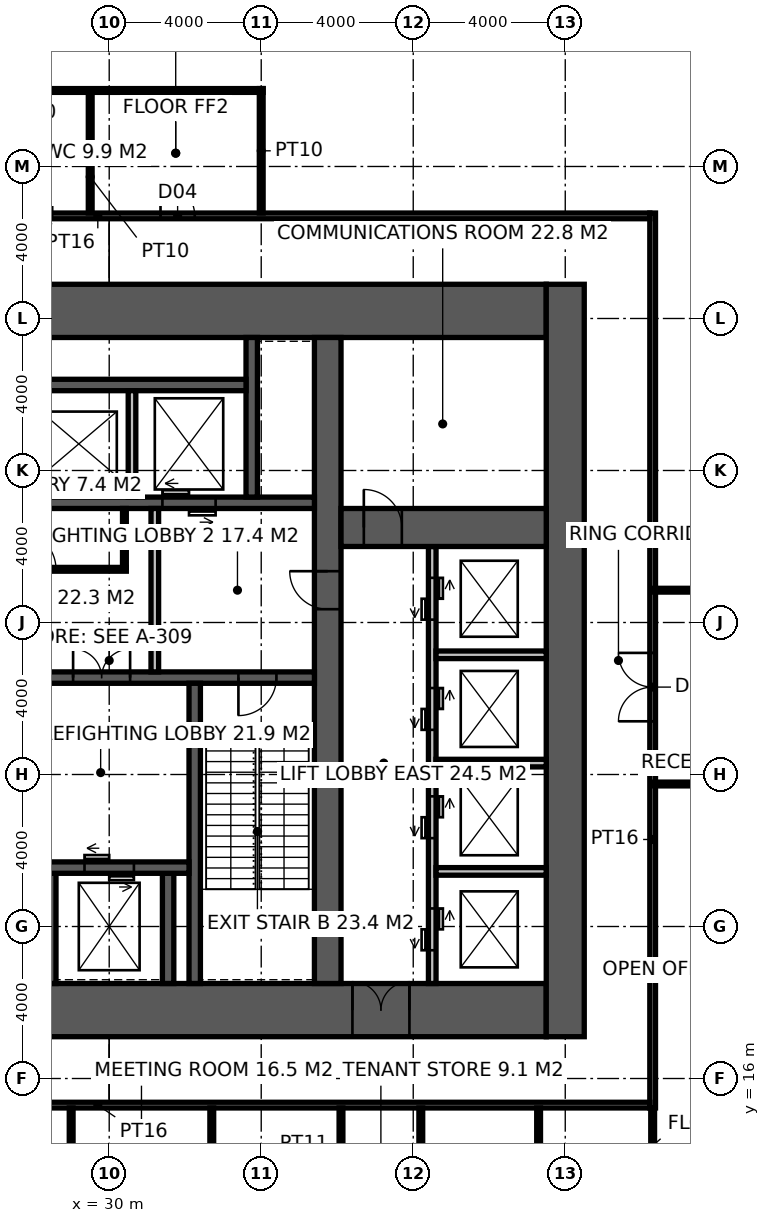
"""IFC4 building model, lengths in metres.
Left out: names, types, materials, properties, quantities, classifications, styles, units other than length and angle.
Written with IfcOpenShell. Run it as: python <this file> out.ifc"""

import sys

from ifc_helpers import new_model, si_unit, direction, frame, frame_2d, origin, place, context, subcontext, project, spatial, rectangle, extrude, element, fill, save


model = new_model("IFC4")
c1 = context("Model", 3, precision=1e-05, world=origin(), true_north=direction((0.0, 1.0)))
c2 = subcontext(c1, "Body", "Model", "MODEL_VIEW")
j1 = project(units=[si_unit("LENGTHUNIT", "METRE"), si_unit("PLANEANGLEUNIT", "RADIAN")], contexts=[c1])
p1 = place(None, origin())
s1 = spatial("IfcSite", under=j1, at=p1, CompositionType="ELEMENT")
p2 = place(p1, origin())
s2 = spatial("IfcBuilding", under=s1, at=p2, CompositionType="ELEMENT")
p3 = place(p2, frame((0.0, 0.0, 6.0)))
s3 = spatial("IfcBuildingStorey", under=s2, at=p3, CompositionType="ELEMENT", Elevation=6.0)
p4 = place(p3, frame((18.5, 17.8, -0.15), z_axis=(0.0, 0.0, 1.0), x_axis=(1.0, 0.0, 0.0)))
e1 = element("IfcWall", 1, at=p4, inside=s3, PredefinedType="SHEAR", context=c2, shape_type="SweptSolid", body=[
    extrude(rectangle(XDim=23.0, YDim=1.4, at=frame_2d((11.5, 0.0))), origin(), (0.0, 0.0, 1.0), 5.0),
])
p5 = place(p4, frame((3.45, 0.0, 0.15)))
e2 = element("IfcOpeningElement", 2, at=p5, cuts=e1, PredefinedType="OPENING", context=c2, shape_type="SweptSolid", body=[
    extrude(rectangle(XDim=1.5, YDim=2.4, at=frame_2d((0.75, 1.2))), frame((0.0, 0.71, 0.0), z_axis=(0.0, -1.0, 0.0), x_axis=(1.0, 0.0, 0.0)), (0.0, 0.0, 1.0), 1.42),
])
p6 = place(p4, frame((17.9, 0.0, 0.15)))
e3 = element("IfcOpeningElement", 3, at=p6, cuts=e1, PredefinedType="OPENING", context=c2, shape_type="SweptSolid", body=[
    extrude(rectangle(XDim=1.5, YDim=2.4, at=frame_2d((0.75, 1.2))), frame((0.0, 0.71, 0.0), z_axis=(0.0, -1.0, 0.0), x_axis=(1.0, 0.0, 0.0)), (0.0, 0.0, 1.0), 1.42),
])
p7 = place(p4, frame((0.9, 0.0, 0.15)))
e4 = element("IfcOpeningElement", 4, at=p7, cuts=e1, PredefinedType="OPENING", context=c2, shape_type="SweptSolid", body=[
    extrude(rectangle(XDim=1.0, YDim=2.2, at=frame_2d((0.5, 1.1))), frame((0.0, 0.71, 0.0), z_axis=(0.0, -1.0, 0.0), x_axis=(1.0, 0.0, 0.0)), (0.0, 0.0, 1.0), 1.42),
])
p8 = place(p3, frame((18.5, 36.2, -0.15), z_axis=(0.0, 0.0, 1.0), x_axis=(1.0, 0.0, 0.0)))
e5 = element("IfcWall", 5, at=p8, inside=s3, PredefinedType="SHEAR", context=c2, shape_type="SweptSolid", body=[
    extrude(rectangle(XDim=23.0, YDim=1.4, at=frame_2d((11.5, 0.0))), origin(), (0.0, 0.0, 1.0), 5.0),
])
p9 = place(p3, frame((42.0, 17.1, -0.15), z_axis=(0.0, 0.0, 1.0), x_axis=(0.0, 1.0, 0.0)))
e6 = element("IfcWall", 6, at=p9, inside=s3, PredefinedType="SHEAR", context=c2, shape_type="SweptSolid", body=[
    extrude(rectangle(XDim=19.8, YDim=1.0, at=frame_2d((9.9, 0.0))), origin(), (0.0, 0.0, 1.0), 5.0),
])
p10 = place(p3, frame((35.75, 18.5, -0.15), z_axis=(0.0, 0.0, 1.0), x_axis=(0.0, 1.0, 0.0)))
e7 = element("IfcWall", 7, at=p10, inside=s3, PredefinedType="SHEAR", context=c2, shape_type="SweptSolid", body=[
    extrude(rectangle(XDim=17.0, YDim=0.7, at=frame_2d((8.5, 0.0))), origin(), (0.0, 0.0, 1.0), 5.0),
])
p11 = place(p10, frame((9.85, 0.0, 0.15)))
e8 = element("IfcOpeningElement", 8, at=p11, cuts=e7, PredefinedType="OPENING", context=c2, shape_type="SweptSolid", body=[
    extrude(rectangle(XDim=1.0, YDim=2.2, at=frame_2d((0.5, 1.1))), frame((0.0, 0.36, 0.0), z_axis=(0.0, -1.0, 0.0), x_axis=(1.0, 0.0, 0.0)), (0.0, 0.0, 1.0), 0.72),
])
p12 = place(p3, frame((24.15, 26.55, -0.15), z_axis=(0.0, 0.0, 1.0), x_axis=(1.0, 0.0, 0.0)))
e9 = element("IfcWall", 9, at=p12, inside=s3, PredefinedType="SHEAR", context=c2, shape_type="SweptSolid", body=[
    extrude(rectangle(XDim=11.25, YDim=0.3, at=frame_2d((5.625, 0.0))), origin(), (0.0, 0.0, 1.0), 5.0),
])
p13 = place(p12, frame((9.25, 0.0, 0.15)))
e10 = element("IfcOpeningElement", 10, at=p13, cuts=e9, PredefinedType="OPENING", context=c2, shape_type="SweptSolid", body=[
    extrude(rectangle(XDim=1.0, YDim=2.2, at=frame_2d((0.5, 1.1))), frame((0.0, 0.16, 0.0), z_axis=(0.0, -1.0, 0.0), x_axis=(1.0, 0.0, 0.0)), (0.0, 0.0, 1.0), 0.32),
])
p14 = place(p12, frame((4.9, 0.0, 0.15)))
e11 = element("IfcOpeningElement", 11, at=p14, cuts=e9, PredefinedType="OPENING", context=c2, shape_type="SweptSolid", body=[
    extrude(rectangle(XDim=1.5, YDim=2.4, at=frame_2d((0.75, 1.2))), frame((0.0, 0.16, 0.0), z_axis=(0.0, -1.0, 0.0), x_axis=(1.0, 0.0, 0.0)), (0.0, 0.0, 1.0), 0.32),
])
p15 = place(p3, frame((32.25, 18.5, -0.15), z_axis=(0.0, 0.0, 1.0), x_axis=(0.0, 1.0, 0.0)))
e12 = element("IfcWall", 12, at=p15, inside=s3, PredefinedType="SHEAR", context=c2, shape_type="SweptSolid", body=[
    extrude(rectangle(XDim=7.9, YDim=0.3, at=frame_2d((3.95, 0.0))), origin(), (0.0, 0.0, 1.0), 5.0),
])
for number, where, z_axis, x_axis in (
    (13, (28.45, 18.5, -0.15), (0.0, 0.0, 1.0), (0.0, 1.0, 0.0)),
    (14, (31.55, 18.5, -0.15), (0.0, 0.0, 1.0), (0.0, 1.0, 0.0)),
):
    element("IfcWall", number, at=place(p3, frame(where, z_axis=z_axis, x_axis=x_axis)), inside=s3, PredefinedType="SHEAR", context=c2, shape_type="SweptSolid", body=[
        extrude(rectangle(XDim=2.9, YDim=0.3, at=frame_2d((1.45, 0.0))), origin(), (0.0, 0.0, 1.0), 5.0),
    ])
p16 = place(p3, frame((28.3, 21.55, -0.15), z_axis=(0.0, 0.0, 1.0), x_axis=(1.0, 0.0, 0.0)))
e15 = element("IfcWall", 15, at=p16, inside=s3, PredefinedType="SHEAR", context=c2, shape_type="SweptSolid", body=[
    extrude(rectangle(XDim=3.8, YDim=0.3, at=frame_2d((1.9, 0.0))), origin(), (0.0, 0.0, 1.0), 5.0),
])
p17 = place(p16, frame((1.05, 0.0, 0.15)))
e16 = element("IfcOpeningElement", 16, at=p17, cuts=e15, PredefinedType="OPENING", context=c2, shape_type="SweptSolid", body=[
    extrude(rectangle(XDim=1.3, YDim=2.4, at=frame_2d((0.65, 1.2))), frame((0.0, 0.16, 0.0), z_axis=(0.0, -1.0, 0.0), x_axis=(1.0, 0.0, 0.0)), (0.0, 0.0, 1.0), 0.32),
])
p18 = place(p3, frame((24.15, 31.15, -0.15), z_axis=(0.0, 0.0, 1.0), x_axis=(1.0, 0.0, 0.0)))
e17 = element("IfcWall", 17, at=p18, inside=s3, PredefinedType="SHEAR", context=c2, shape_type="SweptSolid", body=[
    extrude(rectangle(XDim=11.25, YDim=0.3, at=frame_2d((5.625, 0.0))), origin(), (0.0, 0.0, 1.0), 5.0),
])
p19 = place(p18, frame((7.25, 0.0, 0.15)))
e18 = element("IfcOpeningElement", 18, at=p19, cuts=e17, PredefinedType="OPENING", context=c2, shape_type="SweptSolid", body=[
    extrude(rectangle(XDim=1.4, YDim=2.4, at=frame_2d((0.7, 1.2))), frame((0.0, 0.16, 0.0), z_axis=(0.0, -1.0, 0.0), x_axis=(1.0, 0.0, 0.0)), (0.0, 0.0, 1.0), 0.32),
])
p20 = place(p3, frame((33.75, 31.3, -0.15), z_axis=(0.0, 0.0, 1.0), x_axis=(0.0, 1.0, 0.0)))
e19 = element("IfcWall", 19, at=p20, inside=s3, PredefinedType="SHEAR", context=c2, shape_type="SweptSolid", body=[
    extrude(rectangle(XDim=4.2, YDim=0.3, at=frame_2d((2.1, 0.0))), origin(), (0.0, 0.0, 1.0), 5.0),
])
p21 = place(p3, frame((25.0, 34.25, -0.15), z_axis=(0.0, 0.0, 1.0), x_axis=(1.0, 0.0, 0.0)))
e20 = element("IfcWall", 20, at=p21, inside=s3, PredefinedType="SHEAR", context=c2, shape_type="SweptSolid", body=[
    extrude(rectangle(XDim=8.6, YDim=0.3, at=frame_2d((4.3, 0.0))), origin(), (0.0, 0.0, 1.0), 5.0),
])
p22 = place(p3, frame((30.6, 31.3, -0.15), z_axis=(0.0, 0.0, 1.0), x_axis=(0.0, 1.0, 0.0)))
e21 = element("IfcWall", 21, at=p22, inside=s3, PredefinedType="SOLIDWALL", context=c2, shape_type="SweptSolid", body=[
    extrude(rectangle(XDim=2.8, YDim=0.2, at=frame_2d((1.4, 0.0))), origin(), (0.0, 0.0, 1.0), 5.0),
])
p23 = place(p3, frame((38.5, 18.5, -0.15), z_axis=(0.0, 0.0, 1.0), x_axis=(0.0, 1.0, 0.0)))
e22 = element("IfcWall", 22, at=p23, inside=s3, PredefinedType="SOLIDWALL", context=c2, shape_type="SweptSolid", body=[
    extrude(rectangle(XDim=11.5, YDim=0.2, at=frame_2d((5.75, 0.0))), origin(), (0.0, 0.0, 1.0), 5.0),
])
p24 = place(p23, frame((0.875, 0.0, 0.15)))
e23 = element("IfcOpeningElement", 23, at=p24, cuts=e22, PredefinedType="OPENING", context=c2, shape_type="SweptSolid", body=[
    extrude(rectangle(XDim=1.1, YDim=2.2, at=frame_2d((0.55, 1.1))), frame((0.0, 0.11, 0.0), z_axis=(0.0, -1.0, 0.0), x_axis=(1.0, 0.0, 0.0)), (0.0, 0.0, 1.0), 0.22),
])
p25 = place(p23, frame((3.825, 0.0, 0.15)))
e24 = element("IfcOpeningElement", 24, at=p25, cuts=e22, PredefinedType="OPENING", context=c2, shape_type="SweptSolid", body=[
    extrude(rectangle(XDim=1.1, YDim=2.2, at=frame_2d((0.55, 1.1))), frame((0.0, 0.11, 0.0), z_axis=(0.0, -1.0, 0.0), x_axis=(1.0, 0.0, 0.0)), (0.0, 0.0, 1.0), 0.22),
])
p26 = place(p23, frame((6.675, 0.0, 0.15)))
e25 = element("IfcOpeningElement", 25, at=p26, cuts=e22, PredefinedType="OPENING", context=c2, shape_type="SweptSolid", body=[
    extrude(rectangle(XDim=1.1, YDim=2.2, at=frame_2d((0.55, 1.1))), frame((0.0, 0.11, 0.0), z_axis=(0.0, -1.0, 0.0), x_axis=(1.0, 0.0, 0.0)), (0.0, 0.0, 1.0), 0.22),
])
p27 = place(p23, frame((9.575, 0.0, 0.15)))
e26 = element("IfcOpeningElement", 26, at=p27, cuts=e22, PredefinedType="OPENING", context=c2, shape_type="SweptSolid", body=[
    extrude(rectangle(XDim=1.1, YDim=2.2, at=frame_2d((0.55, 1.1))), frame((0.0, 0.11, 0.0), z_axis=(0.0, -1.0, 0.0), x_axis=(1.0, 0.0, 0.0)), (0.0, 0.0, 1.0), 0.22),
])
p28 = place(p3, frame((36.1, 30.5, -0.15), z_axis=(0.0, 0.0, 1.0), x_axis=(1.0, 0.0, 0.0)))
e27 = element("IfcWall", 27, at=p28, inside=s3, PredefinedType="SHEAR", context=c2, shape_type="SweptSolid", body=[
    extrude(rectangle(XDim=5.4, YDim=1.0, at=frame_2d((2.7, 0.0))), origin(), (0.0, 0.0, 1.0), 5.0),
])
p29 = place(p28, frame((0.6, 0.0, 0.15)))
e28 = element("IfcOpeningElement", 28, at=p29, cuts=e27, PredefinedType="OPENING", context=c2, shape_type="SweptSolid", body=[
    extrude(rectangle(XDim=1.0, YDim=2.2, at=frame_2d((0.5, 1.1))), frame((0.0, 0.51, 0.0), z_axis=(0.0, -1.0, 0.0), x_axis=(1.0, 0.0, 0.0)), (0.0, 0.0, 1.0), 1.02),
])
for number, where, z_axis, x_axis in (
    (29, (38.6, 21.45, -0.15), (0.0, 0.0, 1.0), (1.0, 0.0, 0.0)),
    (30, (38.6, 24.3, -0.15), (0.0, 0.0, 1.0), (1.0, 0.0, 0.0)),
    (31, (38.6, 27.15, -0.15), (0.0, 0.0, 1.0), (1.0, 0.0, 0.0)),
):
    element("IfcWall", number, at=place(p3, frame(where, z_axis=z_axis, x_axis=x_axis)), inside=s3, PredefinedType="SOLIDWALL", context=c2, shape_type="SweptSolid", body=[
        extrude(rectangle(XDim=2.9, YDim=0.2, at=frame_2d((1.45, 0.0))), origin(), (0.0, 0.0, 1.0), 5.0),
    ])
p30 = place(p3, frame((31.2, 26.7, 0.0), z_axis=(0.0, 0.0, 1.0), x_axis=(0.0, 1.0, 0.0)))
e32 = element("IfcWall", 32, at=p30, inside=s3, PredefinedType="SOLIDWALL", context=c2, shape_type="SweptSolid", body=[
    extrude(rectangle(XDim=4.3, YDim=0.2, at=frame_2d((2.15, 0.0))), origin(), (0.0, 0.0, 1.0), 4.85),
])
p31 = place(p3, frame((25.75, 29.4, 0.0), z_axis=(0.0, 0.0, 1.0), x_axis=(1.0, 0.0, 0.0)))
e33 = element("IfcWall", 33, at=p31, inside=s3, PredefinedType="PARTITIONING", context=c2, shape_type="SweptSolid", body=[
    extrude(rectangle(XDim=4.7, YDim=0.1, at=frame_2d((2.35, 0.0))), origin(), (0.0, 0.0, 1.0), 4.85),
])
p32 = place(p31, frame((1.85, 0.0, 0.0)))
e34 = element("IfcOpeningElement", 34, at=p32, cuts=e33, PredefinedType="OPENING", context=c2, shape_type="SweptSolid", body=[
    extrude(rectangle(XDim=1.0, YDim=2.2, at=frame_2d((0.5, 1.1))), frame((0.0, 0.06, 0.0), z_axis=(0.0, -1.0, 0.0), x_axis=(1.0, 0.0, 0.0)), (0.0, 0.0, 1.0), 0.12),
])
p33 = place(p3, frame((30.4, 29.45, 0.0), z_axis=(0.0, 0.0, 1.0), x_axis=(0.0, 1.0, 0.0)))
e35 = element("IfcWall", 35, at=p33, inside=s3, PredefinedType="PARTITIONING", context=c2, shape_type="SweptSolid", body=[
    extrude(rectangle(XDim=1.55, YDim=0.1, at=frame_2d((0.775, 0.0))), origin(), (0.0, 0.0, 1.0), 4.85),
])
p34 = place(p3, frame((44.3, 15.225, 0.0), z_axis=(0.0, 0.0, 1.0), x_axis=(0.0, 1.0, 0.0)))
e36 = element("IfcWall", 36, at=p34, inside=s3, PredefinedType="PARTITIONING", context=c2, shape_type="SweptSolid", body=[
    extrude(rectangle(XDim=23.55, YDim=0.15, at=frame_2d((11.775, 0.0))), origin(), (0.0, 0.0, 1.0), 4.85),
])
p35 = place(p34, frame((10.175, 0.0, 0.0)))
e37 = element("IfcOpeningElement", 37, at=p35, cuts=e36, PredefinedType="OPENING", context=c2, shape_type="SweptSolid", body=[
    extrude(rectangle(XDim=1.8, YDim=2.4, at=frame_2d((0.9, 1.2))), frame((0.0, 0.085, 0.0), z_axis=(0.0, -1.0, 0.0), x_axis=(1.0, 0.0, 0.0)), (0.0, 0.0, 1.0), 0.17),
])
p36 = place(p3, frame((15.175, 15.3, 0.0), z_axis=(0.0, 0.0, 1.0), x_axis=(1.0, 0.0, 0.0)))
e38 = element("IfcWall", 38, at=p36, inside=s3, PredefinedType="PARTITIONING", context=c2, shape_type="SweptSolid", body=[
    extrude(rectangle(XDim=29.05, YDim=0.15, at=frame_2d((14.525, 0.0))), origin(), (0.0, 0.0, 1.0), 4.85),
])
p37 = place(p3, frame((15.175, 38.7, 0.0), z_axis=(0.0, 0.0, 1.0), x_axis=(1.0, 0.0, 0.0)))
e39 = element("IfcWall", 39, at=p37, inside=s3, PredefinedType="PARTITIONING", context=c2, shape_type="SweptSolid", body=[
    extrude(rectangle(XDim=29.05, YDim=0.15, at=frame_2d((14.525, 0.0))), origin(), (0.0, 0.0, 1.0), 4.85),
])
p38 = place(p37, frame((8.575, 0.0, 0.0)))
e40 = element("IfcOpeningElement", 40, at=p38, cuts=e39, PredefinedType="OPENING", context=c2, shape_type="SweptSolid", body=[
    extrude(rectangle(XDim=0.9, YDim=2.1, at=frame_2d((0.45, 1.05))), frame((0.0, 0.085, 0.0), z_axis=(0.0, -1.0, 0.0), x_axis=(1.0, 0.0, 0.0)), (0.0, 0.0, 1.0), 0.17),
])
p39 = place(p37, frame((12.325, 0.0, 0.0)))
e41 = element("IfcOpeningElement", 41, at=p39, cuts=e39, PredefinedType="OPENING", context=c2, shape_type="SweptSolid", body=[
    extrude(rectangle(XDim=1.0, YDim=2.1, at=frame_2d((0.5, 1.05))), frame((0.0, 0.085, 0.0), z_axis=(0.0, -1.0, 0.0), x_axis=(1.0, 0.0, 0.0)), (0.0, 0.0, 1.0), 0.17),
])
p40 = place(p37, frame((16.175, 0.0, 0.0)))
e42 = element("IfcOpeningElement", 42, at=p40, cuts=e39, PredefinedType="OPENING", context=c2, shape_type="SweptSolid", body=[
    extrude(rectangle(XDim=0.9, YDim=2.1, at=frame_2d((0.45, 1.05))), frame((0.0, 0.085, 0.0), z_axis=(0.0, -1.0, 0.0), x_axis=(1.0, 0.0, 0.0)), (0.0, 0.0, 1.0), 0.17),
])
p41 = place(p3, frame((34.0, 38.775, 0.0), z_axis=(0.0, 0.0, 1.0), x_axis=(0.0, 1.0, 0.0)))
e43 = element("IfcWall", 43, at=p41, inside=s3, PredefinedType="PARTITIONING", context=c2, shape_type="SweptSolid", body=[
    extrude(rectangle(XDim=3.275, YDim=0.1, at=frame_2d((1.638, 0.0))), origin(), (0.0, 0.0, 1.0), 3.65),
])
p42 = place(p3, frame((21.95, 42.0, 0.0), z_axis=(0.0, 0.0, 1.0), x_axis=(1.0, 0.0, 0.0)))
e44 = element("IfcWall", 44, at=p42, inside=s3, PredefinedType="PARTITIONING", context=c2, shape_type="SweptSolid", body=[
    extrude(rectangle(XDim=12.1, YDim=0.1, at=frame_2d((6.05, 0.0))), origin(), (0.0, 0.0, 1.0), 4.85),
])
p43 = place(p3, frame((29.5, 38.775, 0.0), z_axis=(0.0, 0.0, 1.0), x_axis=(0.0, 1.0, 0.0)))
e45 = element("IfcWall", 45, at=p43, inside=s3, PredefinedType="PARTITIONING", context=c2, shape_type="SweptSolid", body=[
    extrude(rectangle(XDim=3.175, YDim=0.1, at=frame_2d((1.587, 0.0))), origin(), (0.0, 0.0, 1.0), 3.65),
])
for number, where, z_axis, x_axis in (
    (46, (28.999, 10.55, 0.0), (0.0, 0.0, 1.0), (0.0, 1.0, 0.0)),
    (47, (32.699, 10.55, 0.0), (0.0, 0.0, 1.0), (0.0, 1.0, 0.0)),
    (48, (36.099, 10.55, 0.0), (0.0, 0.0, 1.0), (0.0, 1.0, 0.0)),
    (49, (38.199, 10.55, 0.0), (0.0, 0.0, 1.0), (0.0, 1.0, 0.0)),
    (50, (41.299, 10.55, 0.0), (0.0, 0.0, 1.0), (0.0, 1.0, 0.0)),
    (51, (44.3, 10.55, 0.0), (0.0, 0.0, 1.0), (0.0, 1.0, 0.0)),
):
    element("IfcWall", number, at=place(p3, frame(where, z_axis=z_axis, x_axis=x_axis)), inside=s3, PredefinedType="PARTITIONING", context=c2, shape_type="SweptSolid", body=[
        extrude(rectangle(XDim=4.675, YDim=0.1, at=frame_2d((2.337, 0.0))), origin(), (0.0, 0.0, 1.0), 4.85),
    ])
p44 = place(p3, frame((44.3, 23.75, 0.0), z_axis=(0.0, 0.0, 1.0), x_axis=(1.0, 0.0, 0.0)))
e52 = element("IfcWall", 52, at=p44, inside=s3, PredefinedType="PARTITIONING", context=c2, shape_type="SweptSolid", body=[
    extrude(rectangle(XDim=4.5, YDim=0.1, at=frame_2d((2.25, 0.0))), origin(), (0.0, 0.0, 1.0), 3.65),
])
p45 = place(p3, frame((48.8, 28.85, 0.0), z_axis=(0.0, 0.0, 1.0), x_axis=(-1.0, 0.0, 0.0)))
e53 = element("IfcWall", 53, at=p45, inside=s3, PredefinedType="PARTITIONING", context=c2, shape_type="SweptSolid", body=[
    extrude(rectangle(XDim=4.5, YDim=0.1, at=frame_2d((2.25, 0.0))), origin(), (0.0, 0.0, 1.0), 4.85),
])
p46 = place(p13, frame((1.0, 0.0, 0.0), z_axis=(0.0, 0.0, 1.0), x_axis=(-1.0, 0.0, 0.0)))
e54 = element("IfcDoor", 54, at=p46, inside=s3, OperationType="SINGLE_SWING_RIGHT", PredefinedType="DOOR", context=c2, shape_type="SweptSolid", body=[
    extrude(rectangle(XDim=1.0, YDim=2.2, at=frame_2d((0.5, 1.1))), frame((0.0, 0.025, 0.0), z_axis=(0.0, -1.0, 0.0), x_axis=(1.0, 0.0, 0.0)), (0.0, 0.0, 1.0), 0.05),
])
fill(e10, e54)
p47 = place(p11, origin())
e55 = element("IfcDoor", 55, at=p47, inside=s3, OperationType="SINGLE_SWING_RIGHT", PredefinedType="DOOR", context=c2, shape_type="SweptSolid", body=[
    extrude(rectangle(XDim=1.0, YDim=2.2, at=frame_2d((0.5, 1.1))), frame((0.0, 0.025, 0.0), z_axis=(0.0, -1.0, 0.0), x_axis=(1.0, 0.0, 0.0)), (0.0, 0.0, 1.0), 0.05),
])
fill(e8, e55)
p48 = place(p14, origin())
e56 = element("IfcDoor", 56, at=p48, inside=s3, OperationType="DOUBLE_DOOR_DOUBLE_SWING", PredefinedType="DOOR", context=c2, shape_type="SweptSolid", body=[
    extrude(rectangle(XDim=1.5, YDim=2.4, at=frame_2d((0.75, 1.2))), frame((0.0, 0.025, 0.0), z_axis=(0.0, -1.0, 0.0), x_axis=(1.0, 0.0, 0.0)), (0.0, 0.0, 1.0), 0.05),
])
fill(e11, e56)
p49 = place(p32, origin())
e57 = element("IfcDoor", 57, at=p49, inside=s3, OperationType="SINGLE_SWING_LEFT", PredefinedType="DOOR", context=c2, shape_type="SweptSolid", body=[
    extrude(rectangle(XDim=1.0, YDim=2.2, at=frame_2d((0.5, 1.1))), frame((0.0, 0.025, 0.0), z_axis=(0.0, -1.0, 0.0), x_axis=(1.0, 0.0, 0.0)), (0.0, 0.0, 1.0), 0.05),
])
fill(e34, e57)
p50 = place(p6, origin())
e58 = element("IfcDoor", 58, at=p50, inside=s3, OperationType="DOUBLE_DOOR_DOUBLE_SWING", PredefinedType="DOOR", context=c2, shape_type="SweptSolid", body=[
    extrude(rectangle(XDim=1.5, YDim=2.4, at=frame_2d((0.75, 1.2))), frame((0.0, 0.025, 0.0), z_axis=(0.0, -1.0, 0.0), x_axis=(1.0, 0.0, 0.0)), (0.0, 0.0, 1.0), 0.05),
])
fill(e3, e58)
p51 = place(p29, origin())
e59 = element("IfcDoor", 59, at=p51, inside=s3, OperationType="SINGLE_SWING_LEFT", PredefinedType="DOOR", context=c2, shape_type="SweptSolid", body=[
    extrude(rectangle(XDim=1.0, YDim=2.2, at=frame_2d((0.5, 1.1))), frame((0.0, 0.025, 0.0), z_axis=(0.0, -1.0, 0.0), x_axis=(1.0, 0.0, 0.0)), (0.0, 0.0, 1.0), 0.05),
])
fill(e28, e59)
p52 = place(p40, origin())
e60 = element("IfcDoor", 60, at=p52, inside=s3, OperationType="SINGLE_SWING_LEFT", PredefinedType="DOOR", context=c2, shape_type="SweptSolid", body=[
    extrude(rectangle(XDim=0.9, YDim=2.1, at=frame_2d((0.45, 1.05))), frame((0.0, 0.025, 0.0), z_axis=(0.0, -1.0, 0.0), x_axis=(1.0, 0.0, 0.0)), (0.0, 0.0, 1.0), 0.05),
])
fill(e42, e60)
p53 = place(p35, origin())
e61 = element("IfcDoor", 61, at=p53, inside=s3, OperationType="DOUBLE_DOOR_DOUBLE_SWING", PredefinedType="DOOR", context=c2, shape_type="SweptSolid", body=[
    extrude(rectangle(XDim=1.8, YDim=2.4, at=frame_2d((0.9, 1.2))), frame((0.0, 0.025, 0.0), z_axis=(0.0, -1.0, 0.0), x_axis=(1.0, 0.0, 0.0)), (0.0, 0.0, 1.0), 0.05),
])
fill(e37, e61)
p54 = place(p17, origin())
e62 = element("IfcDoor", 62, at=p54, inside=s3, OperationType="DOUBLE_DOOR_SLIDING", PredefinedType="DOOR", context=c2, shape_type="SweptSolid", body=[
    extrude(rectangle(XDim=1.3, YDim=2.4, at=frame_2d((0.65, 1.2))), frame((0.0, 0.025, 0.0), z_axis=(0.0, -1.0, 0.0), x_axis=(1.0, 0.0, 0.0)), (0.0, 0.0, 1.0), 0.05),
])
fill(e16, e62)
p55 = place(p19, origin())
e63 = element("IfcDoor", 63, at=p55, inside=s3, OperationType="DOUBLE_DOOR_SLIDING", PredefinedType="DOOR", context=c2, shape_type="SweptSolid", body=[
    extrude(rectangle(XDim=1.4, YDim=2.4, at=frame_2d((0.7, 1.2))), frame((0.0, 0.025, 0.0), z_axis=(0.0, -1.0, 0.0), x_axis=(1.0, 0.0, 0.0)), (0.0, 0.0, 1.0), 0.05),
])
fill(e18, e63)
p56 = place(p24, origin())
e64 = element("IfcDoor", 64, at=p56, inside=s3, OperationType="DOUBLE_DOOR_SLIDING", PredefinedType="DOOR", context=c2, shape_type="SweptSolid", body=[
    extrude(rectangle(XDim=1.1, YDim=2.2, at=frame_2d((0.55, 1.1))), frame((0.0, 0.025, 0.0), z_axis=(0.0, -1.0, 0.0), x_axis=(1.0, 0.0, 0.0)), (0.0, 0.0, 1.0), 0.05),
])
fill(e23, e64)
p57 = place(p25, origin())
e65 = element("IfcDoor", 65, at=p57, inside=s3, OperationType="DOUBLE_DOOR_SLIDING", PredefinedType="DOOR", context=c2, shape_type="SweptSolid", body=[
    extrude(rectangle(XDim=1.1, YDim=2.2, at=frame_2d((0.55, 1.1))), frame((0.0, 0.025, 0.0), z_axis=(0.0, -1.0, 0.0), x_axis=(1.0, 0.0, 0.0)), (0.0, 0.0, 1.0), 0.05),
])
fill(e24, e65)
p58 = place(p26, origin())
e66 = element("IfcDoor", 66, at=p58, inside=s3, OperationType="DOUBLE_DOOR_SLIDING", PredefinedType="DOOR", context=c2, shape_type="SweptSolid", body=[
    extrude(rectangle(XDim=1.1, YDim=2.2, at=frame_2d((0.55, 1.1))), frame((0.0, 0.025, 0.0), z_axis=(0.0, -1.0, 0.0), x_axis=(1.0, 0.0, 0.0)), (0.0, 0.0, 1.0), 0.05),
])
fill(e25, e66)
p59 = place(p27, origin())
e67 = element("IfcDoor", 67, at=p59, inside=s3, OperationType="DOUBLE_DOOR_SLIDING", PredefinedType="DOOR", context=c2, shape_type="SweptSolid", body=[
    extrude(rectangle(XDim=1.1, YDim=2.2, at=frame_2d((0.55, 1.1))), frame((0.0, 0.025, 0.0), z_axis=(0.0, -1.0, 0.0), x_axis=(1.0, 0.0, 0.0)), (0.0, 0.0, 1.0), 0.05),
])
fill(e26, e67)
save(model, sys.argv[1])
